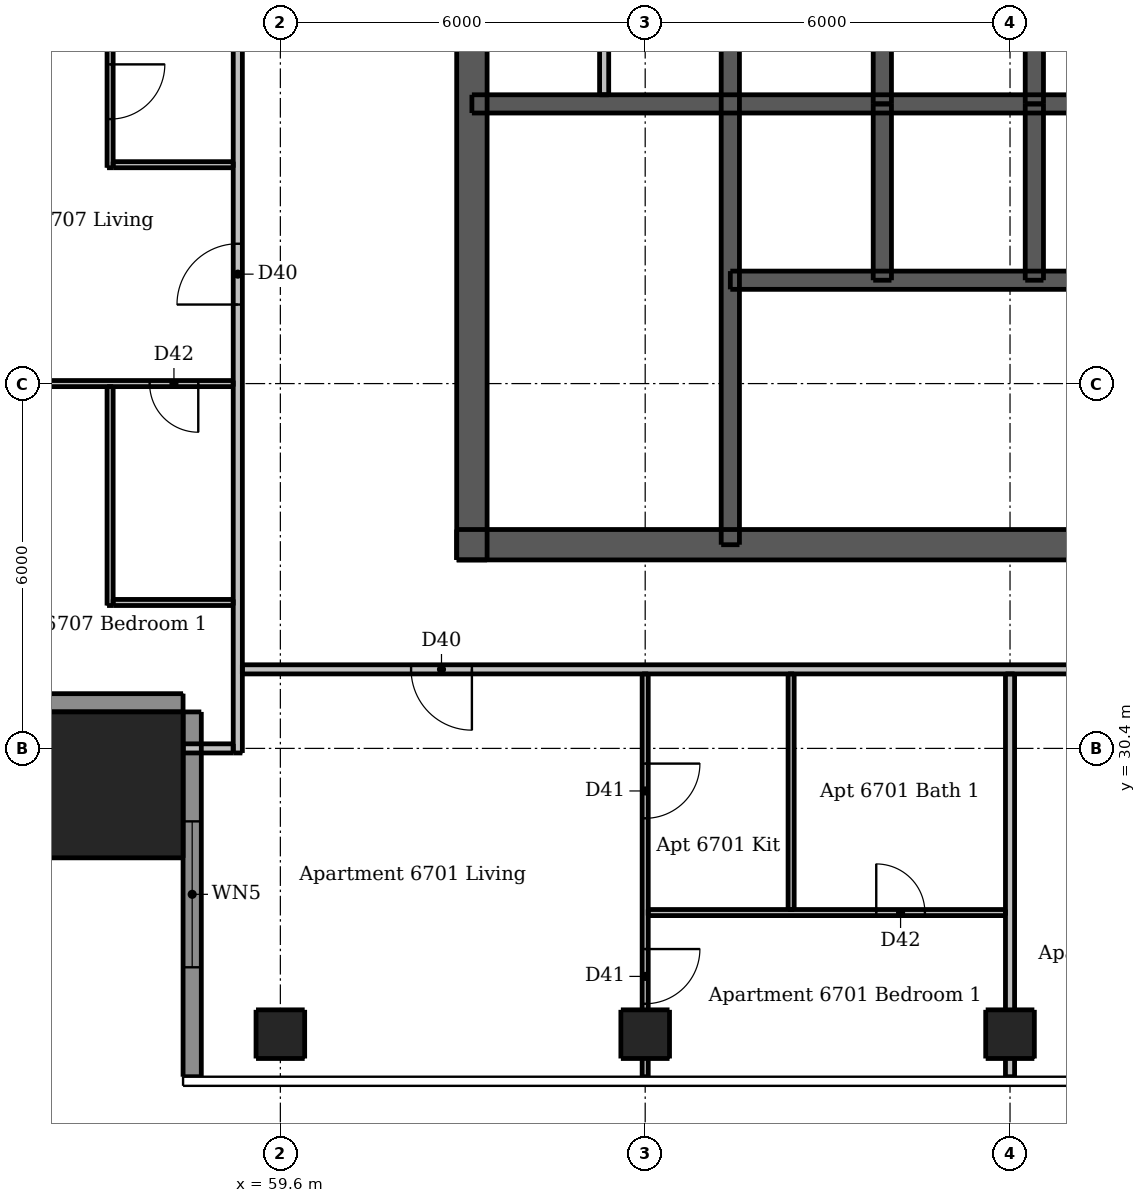
"""IFC4 building model, lengths in metres.
Left out: names, types, materials, properties, quantities, classifications, styles, units other than length and angle.
Written with IfcOpenShell. Run it as: python <this file> out.ifc"""

import sys

from ifc_helpers import new_model, si_unit, direction, frame, frame_2d, origin, origin_2d, place, context, subcontext, project, spatial, rectangle, extrude, element, fill, save


model = new_model("IFC4")
c1 = context("Model", 3, precision=1e-05, world=origin(), true_north=direction((0.0, 1.0)))
c2 = subcontext(c1, "Body", "Model", "MODEL_VIEW")
j1 = project(units=[si_unit("LENGTHUNIT", "METRE"), si_unit("PLANEANGLEUNIT", "RADIAN")], contexts=[c1])
p1 = place(None, origin())
s1 = spatial("IfcSite", under=j1, at=p1, CompositionType="ELEMENT")
p2 = place(p1, origin())
s2 = spatial("IfcBuilding", under=s1, at=p2, CompositionType="ELEMENT")
p3 = place(p2, frame((0.0, 0.0, 252.1)))
s3 = spatial("IfcBuildingStorey", under=s2, at=p3, CompositionType="ELEMENT", Elevation=252.1)
p4 = place(p3, frame((62.5, 33.75, 0.0), z_axis=(0.0, 0.0, 1.0), x_axis=(1.0, 0.0, 0.0)))
e1 = element("IfcWall", 1, at=p4, inside=s3, PredefinedType="SHEAR", context=c2, shape_type="SweptSolid", body=[
    extrude(rectangle(XDim=24.0, YDim=0.5, at=frame_2d((12.0, 0.0))), origin(), (0.0, 0.0, 1.0), 3.05),
])
p5 = place(p4, frame((1.875, 0.0, 0.0)))
e2 = element("IfcOpeningElement", 2, at=p5, cuts=e1, PredefinedType="OPENING", context=c2, shape_type="SweptSolid", body=[
    extrude(rectangle(XDim=1.1, YDim=2.1, at=frame_2d((0.55, 1.05))), frame((0.0, 0.26, 0.0), z_axis=(0.0, -1.0, 0.0), x_axis=(1.0, 0.0, 0.0)), (0.0, 0.0, 1.0), 0.52),
])
p6 = place(p4, frame((21.025, 0.0, 0.0)))
e3 = element("IfcOpeningElement", 3, at=p6, cuts=e1, PredefinedType="OPENING", context=c2, shape_type="SweptSolid", body=[
    extrude(rectangle(XDim=1.1, YDim=2.1, at=frame_2d((0.55, 1.05))), frame((0.0, 0.26, 0.0), z_axis=(0.0, -1.0, 0.0), x_axis=(1.0, 0.0, 0.0)), (0.0, 0.0, 1.0), 0.52),
])
p7 = place(p4, frame((8.0, 0.0, 0.0)))
e4 = element("IfcOpeningElement", 4, at=p7, cuts=e1, PredefinedType="OPENING", context=c2, shape_type="SweptSolid", body=[
    extrude(rectangle(XDim=1.1, YDim=2.1, at=frame_2d((0.55, 1.05))), frame((0.0, 0.26, 0.0), z_axis=(0.0, -1.0, 0.0), x_axis=(1.0, 0.0, 0.0)), (0.0, 0.0, 1.0), 0.52),
])
p8 = place(p4, frame((17.512, 0.0, 0.0)))
e5 = element("IfcOpeningElement", 5, at=p8, cuts=e1, PredefinedType="OPENING", context=c2, shape_type="SweptSolid", body=[
    extrude(rectangle(XDim=0.9, YDim=2.1, at=frame_2d((0.45, 1.05))), frame((0.0, 0.26, 0.0), z_axis=(0.0, -1.0, 0.0), x_axis=(1.0, 0.0, 0.0)), (0.0, 0.0, 1.0), 0.52),
])
p9 = place(p3, frame((62.75, 33.5, 0.0), z_axis=(0.0, 0.0, 1.0), x_axis=(0.0, 1.0, 0.0)))
e6 = element("IfcWall", 6, at=p9, inside=s3, PredefinedType="SHEAR", context=c2, shape_type="SweptSolid", body=[
    extrude(rectangle(XDim=24.0, YDim=0.5, at=frame_2d((12.0, 0.0))), origin(), (0.0, 0.0, 1.0), 3.05),
])
p10 = place(p9, frame((11.2, 0.0, 0.0)))
e7 = element("IfcOpeningElement", 7, at=p10, cuts=e6, PredefinedType="OPENING", context=c2, shape_type="SweptSolid", body=[
    extrude(rectangle(XDim=1.6, YDim=2.1, at=frame_2d((0.8, 1.05))), frame((0.0, 0.26, 0.0), z_axis=(0.0, -1.0, 0.0), x_axis=(1.0, 0.0, 0.0)), (0.0, 0.0, 1.0), 0.52),
])
p11 = place(p3, frame((62.75, 41.0, 0.0), z_axis=(0.0, 0.0, 1.0), x_axis=(1.0, 0.0, 0.0)))
e8 = element("IfcWall", 8, at=p11, inside=s3, PredefinedType="SHEAR", context=c2, shape_type="SweptSolid", body=[
    extrude(rectangle(XDim=23.5, YDim=0.3, at=frame_2d((11.75, 0.0))), origin(), (0.0, 0.0, 1.0), 3.05),
])
p12 = place(p3, frame((67.0, 33.75, 0.0), z_axis=(0.0, 0.0, 1.0), x_axis=(0.0, 1.0, 0.0)))
e9 = element("IfcWall", 9, at=p12, inside=s3, PredefinedType="SHEAR", context=c2, shape_type="SweptSolid", body=[
    extrude(rectangle(XDim=10.15, YDim=0.3, at=frame_2d((5.075, 0.0))), origin(), (0.0, 0.0, 1.0), 3.05),
])
p13 = place(p12, frame((0.45, 0.0, 0.0)))
e10 = element("IfcOpeningElement", 10, at=p13, cuts=e9, PredefinedType="OPENING", context=c2, shape_type="SweptSolid", body=[
    extrude(rectangle(XDim=1.1, YDim=2.1, at=frame_2d((0.55, 1.05))), frame((0.0, 0.16, 0.0), z_axis=(0.0, -1.0, 0.0), x_axis=(1.0, 0.0, 0.0)), (0.0, 0.0, 1.0), 0.32),
])
for number, where, z_axis, x_axis in (
    (11, (69.5, 41.0, 0.0), (0.0, 0.0, 1.0), (0.0, 1.0, 0.0)),
    (12, (72.0, 41.0, 0.0), (0.0, 0.0, 1.0), (0.0, 1.0, 0.0)),
):
    element("IfcWall", number, at=place(p3, frame(where, z_axis=z_axis, x_axis=x_axis)), inside=s3, PredefinedType="SHEAR", context=c2, shape_type="SweptSolid", body=[
        extrude(rectangle(XDim=2.9, YDim=0.3, at=frame_2d((1.45, 0.0))), origin(), (0.0, 0.0, 1.0), 3.05),
    ])
p14 = place(p3, frame((67.0, 38.1, 0.0), z_axis=(0.0, 0.0, 1.0), x_axis=(1.0, 0.0, 0.0)))
e13 = element("IfcWall", 13, at=p14, inside=s3, PredefinedType="SHEAR", context=c2, shape_type="SweptSolid", body=[
    extrude(rectangle(XDim=7.5, YDim=0.3, at=frame_2d((3.75, 0.0))), origin(), (0.0, 0.0, 1.0), 3.05),
])
p15 = place(p14, frame((0.7, 0.0, 0.0)))
e14 = element("IfcOpeningElement", 14, at=p15, cuts=e13, PredefinedType="OPENING", context=c2, shape_type="SweptSolid", body=[
    extrude(rectangle(XDim=1.1, YDim=2.1, at=frame_2d((0.55, 1.05))), frame((0.0, 0.16, 0.0), z_axis=(0.0, -1.0, 0.0), x_axis=(1.0, 0.0, 0.0)), (0.0, 0.0, 1.0), 0.32),
])
p16 = place(p14, frame((3.2, 0.0, 0.0)))
e15 = element("IfcOpeningElement", 15, at=p16, cuts=e13, PredefinedType="OPENING", context=c2, shape_type="SweptSolid", body=[
    extrude(rectangle(XDim=1.1, YDim=2.1, at=frame_2d((0.55, 1.05))), frame((0.0, 0.16, 0.0), z_axis=(0.0, -1.0, 0.0), x_axis=(1.0, 0.0, 0.0)), (0.0, 0.0, 1.0), 0.32),
])
p17 = place(p14, frame((5.65, 0.0, 0.0)))
e16 = element("IfcOpeningElement", 16, at=p17, cuts=e13, PredefinedType="OPENING", context=c2, shape_type="SweptSolid", body=[
    extrude(rectangle(XDim=1.2, YDim=2.1, at=frame_2d((0.6, 1.05))), frame((0.0, 0.16, 0.0), z_axis=(0.0, -1.0, 0.0), x_axis=(1.0, 0.0, 0.0)), (0.0, 0.0, 1.0), 0.32),
])
for number, where, z_axis, x_axis in (
    (17, (69.5, 38.1, 0.0), (0.0, 0.0, 1.0), (0.0, 1.0, 0.0)),
    (18, (72.0, 38.1, 0.0), (0.0, 0.0, 1.0), (0.0, 1.0, 0.0)),
):
    element("IfcWall", number, at=place(p3, frame(where, z_axis=z_axis, x_axis=x_axis)), inside=s3, PredefinedType="SHEAR", context=c2, shape_type="SweptSolid", body=[
        extrude(rectangle(XDim=2.9, YDim=0.3, at=frame_2d((1.45, 0.0))), origin(), (0.0, 0.0, 1.0), 3.05),
    ])
for number, where, z_axis, x_axis in (
    (19, (59.6, 25.7, 0.0), (0.0, 0.0, 1.0), (1.0, 0.0, 0.0)),
    (20, (65.6, 25.7, 0.0), (0.0, 0.0, 1.0), (1.0, 0.0, 0.0)),
    (21, (71.6, 25.7, 0.0), (0.0, 0.0, 1.0), (1.0, 0.0, 0.0)),
):
    element("IfcColumn", number, at=place(p3, frame(where, z_axis=z_axis, x_axis=x_axis)), inside=s3, PredefinedType="COLUMN", context=c2, shape_type="SweptSolid", body=[
        extrude(rectangle(XDim=0.8, YDim=0.8, at=origin_2d()), origin(), (0.0, 0.0, 1.0), 3.05),
    ])
p18 = place(p3, frame((56.8, 29.8, 0.0), z_axis=(0.0, 0.0, 1.0), x_axis=(1.0, 0.0, 0.0)))
e22 = element("IfcColumn", 22, at=p18, inside=s3, PredefinedType="COLUMN", context=c2, shape_type="SweptSolid", body=[
    extrude(rectangle(XDim=2.4, YDim=2.4, at=origin_2d()), origin(), (0.0, 0.0, 1.0), 3.3),
])
p19 = place(p3, frame((53.0, 31.15, 0.0), z_axis=(0.0, 0.0, 1.0), x_axis=(1.0, 0.0, 0.0)))
e23 = element("IfcWall", 23, at=p19, inside=s3, PredefinedType="SOLIDWALL", context=c2, shape_type="SweptSolid", body=[
    extrude(rectangle(XDim=5.0, YDim=0.3, at=frame_2d((2.5, 0.0))), origin(), (0.0, 0.0, 1.0), 3.05),
])
p20 = place(p3, frame((58.15, 31.0, 0.0), z_axis=(0.0, 0.0, 1.0), x_axis=(0.0, -1.0, 0.0)))
e24 = element("IfcWall", 24, at=p20, inside=s3, PredefinedType="SOLIDWALL", context=c2, shape_type="SweptSolid", body=[
    extrude(rectangle(XDim=6.0, YDim=0.3, at=frame_2d((3.0, 0.0))), origin(), (0.0, 0.0, 1.0), 3.05),
])
p21 = place(p20, frame((1.8, 0.0, 0.15)))
e25 = element("IfcOpeningElement", 25, at=p21, cuts=e24, PredefinedType="OPENING", context=c2, shape_type="SweptSolid", body=[
    extrude(rectangle(XDim=2.4, YDim=2.1, at=frame_2d((1.2, 1.05))), frame((0.0, 0.16, 0.0), z_axis=(0.0, -1.0, 0.0), x_axis=(1.0, 0.0, 0.0)), (0.0, 0.0, 1.0), 0.32),
])
p22 = place(p3, frame((64.925, 41.15, 0.0), z_axis=(0.0, 0.0, 1.0), x_axis=(0.0, 1.0, 0.0)))
e26 = element("IfcWall", 26, at=p22, inside=s3, PredefinedType="PLUMBINGWALL", context=c2, shape_type="SweptSolid", body=[
    extrude(rectangle(XDim=2.6, YDim=0.15, at=frame_2d((1.3, 0.0))), origin(), (0.0, 0.0, 1.0), 3.05),
])
p23 = place(p3, frame((56.8, 32.75, 0.0), z_axis=(0.0, 0.0, 1.0), x_axis=(0.0, 1.0, 0.0)))
e27 = element("IfcWall", 27, at=p23, inside=s3, PredefinedType="PARTITIONING", context=c2, shape_type="SweptSolid", body=[
    extrude(rectangle(XDim=3.6, YDim=0.1, at=frame_2d((1.8, 0.0))), origin(), (0.0, 0.0, 1.0), 3.05),
])
p24 = place(p3, frame((56.8, 42.35, 0.0), z_axis=(0.0, 0.0, 1.0), x_axis=(0.0, -1.0, 0.0)))
e28 = element("IfcWall", 28, at=p24, inside=s3, PredefinedType="PARTITIONING", context=c2, shape_type="SweptSolid", body=[
    extrude(rectangle(XDim=2.4, YDim=0.1, at=frame_2d((1.2, 0.0))), origin(), (0.0, 0.0, 1.0), 3.05),
])
p25 = place(p24, frame((0.7, 0.0, 0.0)))
e29 = element("IfcOpeningElement", 29, at=p25, cuts=e28, PredefinedType="OPENING", context=c2, shape_type="SweptSolid", body=[
    extrude(rectangle(XDim=0.9, YDim=2.1, at=frame_2d((0.45, 1.05))), frame((0.0, 0.06, 0.0), z_axis=(0.0, -1.0, 0.0), x_axis=(1.0, 0.0, 0.0)), (0.0, 0.0, 1.0), 0.12),
])
p26 = place(p3, frame((65.6, 31.625, 0.0), z_axis=(0.0, 0.0, 1.0), x_axis=(0.0, -1.0, 0.0)))
e30 = element("IfcWall", 30, at=p26, inside=s3, PredefinedType="PARTITIONING", context=c2, shape_type="SweptSolid", body=[
    extrude(rectangle(XDim=6.625, YDim=0.1, at=frame_2d((3.312, 0.0))), origin(), (0.0, 0.0, 1.0), 2.59),
])
p27 = place(p26, frame((1.475, 0.0, 0.0)))
e31 = element("IfcOpeningElement", 31, at=p27, cuts=e30, PredefinedType="OPENING", context=c2, shape_type="SweptSolid", body=[
    extrude(rectangle(XDim=0.9, YDim=2.1, at=frame_2d((0.45, 1.05))), frame((0.0, 0.06, 0.0), z_axis=(0.0, -1.0, 0.0), x_axis=(1.0, 0.0, 0.0)), (0.0, 0.0, 1.0), 0.12),
])
p28 = place(p26, frame((4.525, 0.0, 0.0)))
e32 = element("IfcOpeningElement", 32, at=p28, cuts=e30, PredefinedType="OPENING", context=c2, shape_type="SweptSolid", body=[
    extrude(rectangle(XDim=0.9, YDim=2.1, at=frame_2d((0.45, 1.05))), frame((0.0, 0.06, 0.0), z_axis=(0.0, -1.0, 0.0), x_axis=(1.0, 0.0, 0.0)), (0.0, 0.0, 1.0), 0.12),
])
p29 = place(p3, frame((68.0, 27.75, 0.0), z_axis=(0.0, 0.0, 1.0), x_axis=(0.0, 1.0, 0.0)))
e33 = element("IfcWall", 33, at=p29, inside=s3, PredefinedType="PARTITIONING", context=c2, shape_type="SweptSolid", body=[
    extrude(rectangle(XDim=3.875, YDim=0.1, at=frame_2d((1.938, 0.0))), origin(), (0.0, 0.0, 1.0), 3.05),
])
p30 = place(p3, frame((56.85, 40.0, 0.0), z_axis=(0.0, 0.0, 1.0), x_axis=(1.0, 0.0, 0.0)))
e34 = element("IfcWall", 34, at=p30, inside=s3, PredefinedType="PARTITIONING", context=c2, shape_type="SweptSolid", body=[
    extrude(rectangle(XDim=1.975, YDim=0.1, at=frame_2d((0.987, 0.0))), origin(), (0.0, 0.0, 1.0), 3.05),
])
p31 = place(p3, frame((58.825, 36.4, 0.0), z_axis=(0.0, 0.0, 1.0), x_axis=(-1.0, 0.0, 0.0)))
e35 = element("IfcWall", 35, at=p31, inside=s3, PredefinedType="PARTITIONING", context=c2, shape_type="SweptSolid", body=[
    extrude(rectangle(XDim=6.825, YDim=0.1, at=frame_2d((3.413, 0.0))), origin(), (0.0, 0.0, 1.0), 2.516),
])
p32 = place(p31, frame((3.975, 0.0, 0.0)))
e36 = element("IfcOpeningElement", 36, at=p32, cuts=e35, PredefinedType="OPENING", context=c2, shape_type="SweptSolid", body=[
    extrude(rectangle(XDim=0.9, YDim=2.1, at=frame_2d((0.45, 1.05))), frame((0.0, 0.06, 0.0), z_axis=(0.0, -1.0, 0.0), x_axis=(1.0, 0.0, 0.0)), (0.0, 0.0, 1.0), 0.12),
])
p33 = place(p31, frame((0.575, 0.0, 0.0)))
e37 = element("IfcOpeningElement", 37, at=p33, cuts=e35, PredefinedType="OPENING", context=c2, shape_type="SweptSolid", body=[
    extrude(rectangle(XDim=0.8, YDim=2.1, at=frame_2d((0.4, 1.05))), frame((0.0, 0.06, 0.0), z_axis=(0.0, -1.0, 0.0), x_axis=(1.0, 0.0, 0.0)), (0.0, 0.0, 1.0), 0.12),
])
p34 = place(p3, frame((56.85, 32.8, 0.0), z_axis=(0.0, 0.0, 1.0), x_axis=(1.0, 0.0, 0.0)))
e38 = element("IfcWall", 38, at=p34, inside=s3, PredefinedType="PARTITIONING", context=c2, shape_type="SweptSolid", body=[
    extrude(rectangle(XDim=1.975, YDim=0.1, at=frame_2d((0.987, 0.0))), origin(), (0.0, 0.0, 1.0), 3.05),
])
p35 = place(p3, frame((65.65, 27.7, 0.0), z_axis=(0.0, 0.0, 1.0), x_axis=(1.0, 0.0, 0.0)))
e39 = element("IfcWall", 39, at=p35, inside=s3, PredefinedType="PARTITIONING", context=c2, shape_type="SweptSolid", body=[
    extrude(rectangle(XDim=5.875, YDim=0.1, at=frame_2d((2.938, 0.0))), origin(), (0.0, 0.0, 1.0), 3.05),
])
p36 = place(p35, frame((3.75, 0.0, 0.0)))
e40 = element("IfcOpeningElement", 40, at=p36, cuts=e39, PredefinedType="OPENING", context=c2, shape_type="SweptSolid", body=[
    extrude(rectangle(XDim=0.8, YDim=2.1, at=frame_2d((0.4, 1.05))), frame((0.0, 0.06, 0.0), z_axis=(0.0, -1.0, 0.0), x_axis=(1.0, 0.0, 0.0)), (0.0, 0.0, 1.0), 0.12),
])
p37 = place(p3, frame((58.9, 30.325, 0.0), z_axis=(0.0, 0.0, 1.0), x_axis=(0.0, 1.0, 0.0)))
e41 = element("IfcWall", 41, at=p37, inside=s3, PredefinedType="PARTITIONING", context=c2, shape_type="SweptSolid", body=[
    extrude(rectangle(XDim=30.85, YDim=0.15, at=frame_2d((15.425, 0.0))), origin(), (0.0, 0.0, 1.0), 3.05),
])
p38 = place(p37, frame((7.375, 0.0, 0.0)))
e42 = element("IfcOpeningElement", 42, at=p38, cuts=e41, PredefinedType="OPENING", context=c2, shape_type="SweptSolid", body=[
    extrude(rectangle(XDim=1.0, YDim=2.1, at=frame_2d((0.5, 1.05))), frame((0.0, 0.085, 0.0), z_axis=(0.0, -1.0, 0.0), x_axis=(1.0, 0.0, 0.0)), (0.0, 0.0, 1.0), 0.17),
])
p39 = place(p37, frame((26.925, 0.0, 0.0)))
e43 = element("IfcOpeningElement", 43, at=p39, cuts=e41, PredefinedType="OPENING", context=c2, shape_type="SweptSolid", body=[
    extrude(rectangle(XDim=1.0, YDim=2.1, at=frame_2d((0.5, 1.05))), frame((0.0, 0.085, 0.0), z_axis=(0.0, -1.0, 0.0), x_axis=(1.0, 0.0, 0.0)), (0.0, 0.0, 1.0), 0.17),
])
p40 = place(p3, frame((71.6, 25.0, 0.0), z_axis=(0.0, 0.0, 1.0), x_axis=(0.0, 1.0, 0.0)))
e44 = element("IfcWall", 44, at=p40, inside=s3, PredefinedType="PARTITIONING", context=c2, shape_type="SweptSolid", body=[
    extrude(rectangle(XDim=6.625, YDim=0.15, at=frame_2d((3.312, 0.0))), origin(), (0.0, 0.0, 1.0), 2.59),
])
p41 = place(p3, frame((89.525, 31.7, 0.0), z_axis=(0.0, 0.0, 1.0), x_axis=(-1.0, 0.0, 0.0)))
e45 = element("IfcWall", 45, at=p41, inside=s3, PredefinedType="PARTITIONING", context=c2, shape_type="SweptSolid", body=[
    extrude(rectangle(XDim=30.55, YDim=0.15, at=frame_2d((15.275, 0.0))), origin(), (0.0, 0.0, 1.0), 3.05),
])
p42 = place(p41, frame((26.775, 0.0, 0.0)))
e46 = element("IfcOpeningElement", 46, at=p42, cuts=e45, PredefinedType="OPENING", context=c2, shape_type="SweptSolid", body=[
    extrude(rectangle(XDim=1.0, YDim=2.1, at=frame_2d((0.5, 1.05))), frame((0.0, 0.085, 0.0), z_axis=(0.0, -1.0, 0.0), x_axis=(1.0, 0.0, 0.0)), (0.0, 0.0, 1.0), 0.17),
])
p43 = place(p41, frame((6.925, 0.0, 0.0)))
e47 = element("IfcOpeningElement", 47, at=p43, cuts=e45, PredefinedType="OPENING", context=c2, shape_type="SweptSolid", body=[
    extrude(rectangle(XDim=1.0, YDim=2.1, at=frame_2d((0.5, 1.05))), frame((0.0, 0.085, 0.0), z_axis=(0.0, -1.0, 0.0), x_axis=(1.0, 0.0, 0.0)), (0.0, 0.0, 1.0), 0.17),
])
p44 = place(p3, frame((58.0, 30.4, 0.0), z_axis=(0.0, 0.0, 1.0), x_axis=(1.0, 0.0, 0.0)))
e48 = element("IfcWall", 48, at=p44, inside=s3, PredefinedType="PARTITIONING", context=c2, shape_type="SweptSolid", body=[
    extrude(rectangle(XDim=0.825, YDim=0.15, at=frame_2d((0.413, 0.0))), origin(), (0.0, 0.0, 1.0), 3.05),
])
p45 = place(p21, origin())
e49 = element("IfcWindow", 49, at=p45, inside=s3, PartitioningType="DOUBLE_PANEL_VERTICAL", PredefinedType="WINDOW", context=c2, shape_type="SweptSolid", body=[
    extrude(rectangle(XDim=2.4, YDim=2.1, at=frame_2d((1.2, 1.05))), frame((0.0, 0.03, 0.0), z_axis=(0.0, -1.0, 0.0), x_axis=(1.0, 0.0, 0.0)), (0.0, 0.0, 1.0), 0.06),
])
fill(e25, e49)
p46 = place(p5, origin())
e50 = element("IfcDoor", 50, at=p46, inside=s3, OperationType="SINGLE_SWING_LEFT", PredefinedType="DOOR", context=c2, shape_type="SweptSolid", body=[
    extrude(rectangle(XDim=1.1, YDim=2.1, at=frame_2d((0.55, 1.05))), frame((0.0, 0.237, 0.0), z_axis=(0.0, -1.0, 0.0), x_axis=(1.0, 0.0, 0.0)), (0.0, 0.0, 1.0), 0.05),
])
fill(e2, e50)
p47 = place(p7, origin())
e51 = element("IfcDoor", 51, at=p47, inside=s3, OperationType="SINGLE_SWING_LEFT", PredefinedType="DOOR", context=c2, shape_type="SweptSolid", body=[
    extrude(rectangle(XDim=1.1, YDim=2.1, at=frame_2d((0.55, 1.05))), frame((0.0, 0.237, 0.0), z_axis=(0.0, -1.0, 0.0), x_axis=(1.0, 0.0, 0.0)), (0.0, 0.0, 1.0), 0.05),
])
fill(e4, e51)
p48 = place(p13, origin())
e52 = element("IfcDoor", 52, at=p48, inside=s3, OperationType="SINGLE_SWING_RIGHT", PredefinedType="DOOR", context=c2, shape_type="SweptSolid", body=[
    extrude(rectangle(XDim=1.1, YDim=2.1, at=frame_2d((0.55, 1.05))), frame((0.0, -0.087, 0.0), z_axis=(0.0, -1.0, 0.0), x_axis=(1.0, 0.0, 0.0)), (0.0, 0.0, 1.0), 0.05),
])
fill(e10, e52)
p49 = place(p15, origin())
e53 = element("IfcDoor", 53, at=p49, inside=s3, OperationType="DOUBLE_DOOR_SLIDING", PredefinedType="DOOR", context=c2, shape_type="SweptSolid", body=[
    extrude(rectangle(XDim=1.1, YDim=2.1, at=frame_2d((0.55, 1.05))), frame((0.0, 0.025, 0.0), z_axis=(0.0, -1.0, 0.0), x_axis=(1.0, 0.0, 0.0)), (0.0, 0.0, 1.0), 0.05),
])
fill(e14, e53)
p50 = place(p16, origin())
e54 = element("IfcDoor", 54, at=p50, inside=s3, OperationType="DOUBLE_DOOR_SLIDING", PredefinedType="DOOR", context=c2, shape_type="SweptSolid", body=[
    extrude(rectangle(XDim=1.1, YDim=2.1, at=frame_2d((0.55, 1.05))), frame((0.0, 0.025, 0.0), z_axis=(0.0, -1.0, 0.0), x_axis=(1.0, 0.0, 0.0)), (0.0, 0.0, 1.0), 0.05),
])
fill(e15, e54)
p51 = place(p42, origin())
e55 = element("IfcDoor", 55, at=p51, inside=s3, OperationType="SINGLE_SWING_LEFT", PredefinedType="DOOR", context=c2, shape_type="SweptSolid", body=[
    extrude(rectangle(XDim=1.0, YDim=2.1, at=frame_2d((0.5, 1.05))), frame((0.0, 0.025, 0.0), z_axis=(0.0, -1.0, 0.0), x_axis=(1.0, 0.0, 0.0)), (0.0, 0.0, 1.0), 0.05),
])
fill(e46, e55)
p52 = place(p27, origin())
e56 = element("IfcDoor", 56, at=p52, inside=s3, OperationType="SINGLE_SWING_LEFT", PredefinedType="DOOR", context=c2, shape_type="SweptSolid", body=[
    extrude(rectangle(XDim=0.9, YDim=2.1, at=frame_2d((0.45, 1.05))), frame((0.0, 0.025, 0.0), z_axis=(0.0, -1.0, 0.0), x_axis=(1.0, 0.0, 0.0)), (0.0, 0.0, 1.0), 0.05),
])
fill(e31, e56)
p53 = place(p28, origin())
e57 = element("IfcDoor", 57, at=p53, inside=s3, OperationType="SINGLE_SWING_LEFT", PredefinedType="DOOR", context=c2, shape_type="SweptSolid", body=[
    extrude(rectangle(XDim=0.9, YDim=2.1, at=frame_2d((0.45, 1.05))), frame((0.0, 0.025, 0.0), z_axis=(0.0, -1.0, 0.0), x_axis=(1.0, 0.0, 0.0)), (0.0, 0.0, 1.0), 0.05),
])
fill(e32, e57)
p54 = place(p36, origin())
e58 = element("IfcDoor", 58, at=p54, inside=s3, OperationType="SINGLE_SWING_LEFT", PredefinedType="DOOR", context=c2, shape_type="SweptSolid", body=[
    extrude(rectangle(XDim=0.8, YDim=2.1, at=frame_2d((0.4, 1.05))), frame((0.0, 0.025, 0.0), z_axis=(0.0, -1.0, 0.0), x_axis=(1.0, 0.0, 0.0)), (0.0, 0.0, 1.0), 0.05),
])
fill(e40, e58)
p55 = place(p38, origin())
e59 = element("IfcDoor", 59, at=p55, inside=s3, OperationType="SINGLE_SWING_LEFT", PredefinedType="DOOR", context=c2, shape_type="SweptSolid", body=[
    extrude(rectangle(XDim=1.0, YDim=2.1, at=frame_2d((0.5, 1.05))), frame((0.0, 0.025, 0.0), z_axis=(0.0, -1.0, 0.0), x_axis=(1.0, 0.0, 0.0)), (0.0, 0.0, 1.0), 0.05),
])
fill(e42, e59)
p56 = place(p25, origin())
e60 = element("IfcDoor", 60, at=p56, inside=s3, OperationType="SINGLE_SWING_LEFT", PredefinedType="DOOR", context=c2, shape_type="SweptSolid", body=[
    extrude(rectangle(XDim=0.9, YDim=2.1, at=frame_2d((0.45, 1.05))), frame((0.0, 0.025, 0.0), z_axis=(0.0, -1.0, 0.0), x_axis=(1.0, 0.0, 0.0)), (0.0, 0.0, 1.0), 0.05),
])
fill(e29, e60)
p57 = place(p33, origin())
e61 = element("IfcDoor", 61, at=p57, inside=s3, OperationType="SINGLE_SWING_LEFT", PredefinedType="DOOR", context=c2, shape_type="SweptSolid", body=[
    extrude(rectangle(XDim=0.8, YDim=2.1, at=frame_2d((0.4, 1.05))), frame((0.0, 0.025, 0.0), z_axis=(0.0, -1.0, 0.0), x_axis=(1.0, 0.0, 0.0)), (0.0, 0.0, 1.0), 0.05),
])
fill(e37, e61)
save(model, sys.argv[1])
